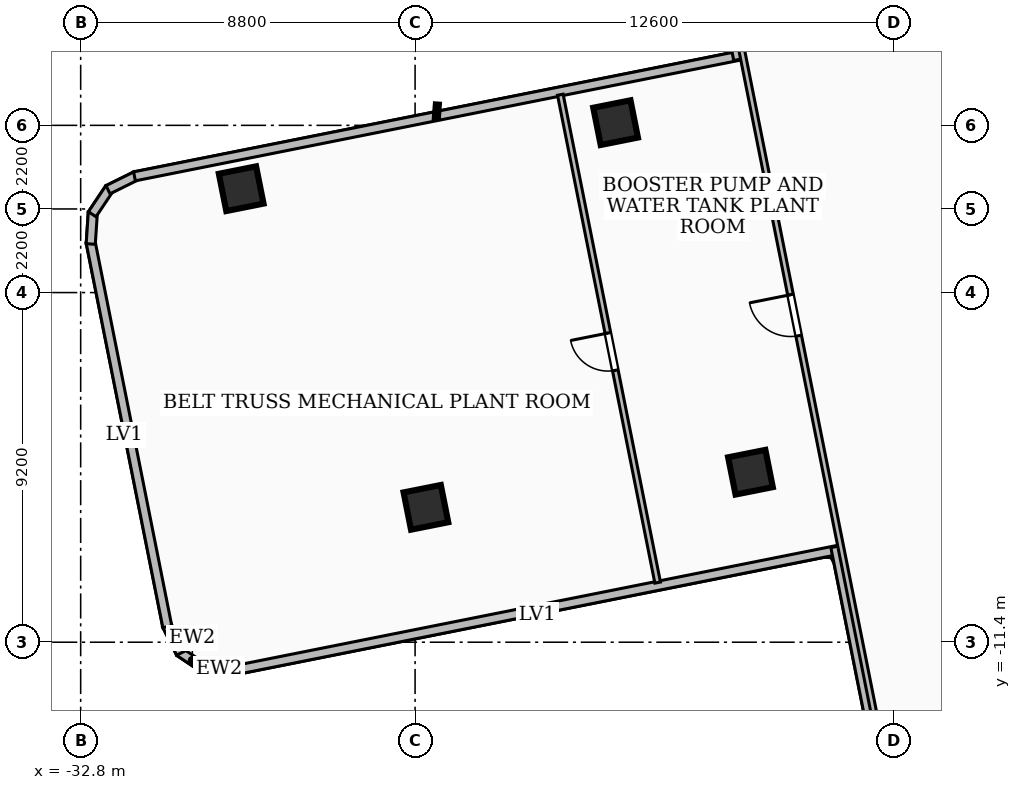
"""IFC4 building model, lengths in metres.
Left out: names, types, materials, properties, quantities, classifications, styles, units other than length and angle.
Written with IfcOpenShell. Run it as: python <this file> out.ifc"""

import sys

from ifc_helpers import new_model, si_unit, direction, frame, frame_2d, origin, origin_2d, place, context, subcontext, project, spatial, rectangle, extrude, element, fill, save


model = new_model("IFC4")
c1 = context("Model", 3, precision=1e-05, world=origin(), true_north=direction((0.0, 1.0)))
c2 = subcontext(c1, "Body", "Model", "MODEL_VIEW")
j1 = project(units=[si_unit("LENGTHUNIT", "METRE"), si_unit("PLANEANGLEUNIT", "RADIAN")], contexts=[c1])
p1 = place(None, origin())
s1 = spatial("IfcSite", under=j1, at=p1, CompositionType="ELEMENT")
p2 = place(p1, origin())
s2 = spatial("IfcBuilding", under=s1, at=p2, CompositionType="ELEMENT")
p3 = place(p2, frame((0.0, 0.0, 107.28)))
s3 = spatial("IfcBuildingStorey", under=s2, at=p3, CompositionType="ELEMENT", Elevation=107.28)
for number, where, z_axis, x_axis in (
    (1, (-18.724, 2.271, 0.0), (0.0, 0.0, 1.0), (0.981, 0.196, 0.0)),
    (2, (-15.175, -6.927, 0.0), (0.0, 0.0, 1.0), (0.981, 0.196, 0.0)),
    (3, (-28.576, 0.533, 0.0), (0.0, 0.0, 1.0), (0.981, 0.196, 0.0)),
    (4, (-23.715, -7.851, 0.0), (0.0, 0.0, 1.0), (0.981, 0.196, 0.0)),
):
    element("IfcColumn", number, at=place(p3, frame(where, z_axis=z_axis, x_axis=x_axis)), inside=s3, PredefinedType="COLUMN", context=c2, shape_type="SweptSolid", body=[
        extrude(rectangle(XDim=1.0, YDim=1.0, at=origin_2d()), origin(), (0.0, 0.0, 1.0), 4.68),
    ])
p4 = place(p3, frame((-12.829, -8.962, 0.0), z_axis=(0.0, 0.0, 1.0), x_axis=(-0.980676331544, -0.195637247858, 0.0)))
e5 = element("IfcWall", 5, at=p4, inside=s3, PredefinedType="SOLIDWALL", context=c2, shape_type="SweptSolid", body=[
    extrude(rectangle(XDim=16.275, YDim=0.24, at=frame_2d((8.138, 0.0))), origin(), (0.0, 0.0, 1.0), 2.212),
])
p5 = place(p3, frame((-28.74, -12.143, 0.0), z_axis=(0.0, 0.0, 1.0), x_axis=(-0.997792951373, 0.06640200442, 0.0)))
e6 = element("IfcWall", 6, at=p5, inside=s3, PredefinedType="SOLIDWALL", context=c2, shape_type="SweptSolid", body=[
    extrude(rectangle(XDim=0.831, YDim=0.24, at=frame_2d((0.416, 0.0))), origin(), (0.0, 0.0, 1.0), 4.42),
])
p6 = place(p3, frame((-29.523, -12.104, 0.0), z_axis=(0.0, 0.0, 1.0), x_axis=(-0.831727143475, 0.555184616867, 0.0)))
e7 = element("IfcWall", 7, at=p6, inside=s3, PredefinedType="SOLIDWALL", context=c2, shape_type="SweptSolid", body=[
    extrude(rectangle(XDim=0.814, YDim=0.24, at=frame_2d((0.407, 0.0))), origin(), (0.0, 0.0, 1.0), 4.42),
])
p7 = place(p3, frame((-30.168, -11.688, 0.0), z_axis=(0.0, 0.0, 1.0), x_axis=(-0.443794266413, 0.896128701191, 0.0)))
e8 = element("IfcWall", 8, at=p7, inside=s3, PredefinedType="SOLIDWALL", context=c2, shape_type="SweptSolid", body=[
    extrude(rectangle(XDim=0.829, YDim=0.24, at=frame_2d((0.415, 0.0))), origin(), (0.0, 0.0, 1.0), 4.42),
])
p8 = place(p3, frame((-30.52, -10.992, 0.0), z_axis=(0.0, 0.0, 1.0), x_axis=(-0.195565576703, 0.980690626655, 0.0)))
e9 = element("IfcWall", 9, at=p8, inside=s3, PredefinedType="SOLIDWALL", context=c2, shape_type="SweptSolid", body=[
    extrude(rectangle(XDim=10.319, YDim=0.24, at=frame_2d((5.16, 0.0))), origin(), (0.0, 0.0, 1.0), 4.42),
])
p9 = place(p3, frame((-32.535, -0.922, 0.0), z_axis=(0.0, 0.0, 1.0), x_axis=(0.066109477186, 0.997812375663, 0.0)))
e10 = element("IfcWall", 10, at=p9, inside=s3, PredefinedType="SOLIDWALL", context=c2, shape_type="SweptSolid", body=[
    extrude(rectangle(XDim=0.831, YDim=0.24, at=frame_2d((0.416, 0.0))), origin(), (0.0, 0.0, 1.0), 4.42),
])
p10 = place(p3, frame((-32.496, -0.139, 0.0), z_axis=(0.0, 0.0, 1.0), x_axis=(0.555392052936, 0.831588640817, 0.0)))
e11 = element("IfcWall", 11, at=p10, inside=s3, PredefinedType="SOLIDWALL", context=c2, shape_type="SweptSolid", body=[
    extrude(rectangle(XDim=0.814, YDim=0.24, at=frame_2d((0.407, 0.0))), origin(), (0.0, 0.0, 1.0), 4.42),
])
p11 = place(p3, frame((-32.08, 0.506, 0.0), z_axis=(0.0, 0.0, 1.0), x_axis=(0.896186678749, 0.443677176371, 0.0)))
e12 = element("IfcWall", 12, at=p11, inside=s3, PredefinedType="SOLIDWALL", context=c2, shape_type="SweptSolid", body=[
    extrude(rectangle(XDim=0.829, YDim=0.24, at=frame_2d((0.415, 0.0))), origin(), (0.0, 0.0, 1.0), 4.42),
])
p12 = place(p3, frame((-31.384, 0.858, 0.0), z_axis=(0.0, 0.0, 1.0), x_axis=(0.980678627862, 0.195625736687, 0.0)))
e13 = element("IfcWall", 13, at=p12, inside=s3, PredefinedType="SOLIDWALL", context=c2, shape_type="SweptSolid", body=[
    extrude(rectangle(XDim=16.276, YDim=0.24, at=frame_2d((8.138, 0.0))), origin(), (0.0, 0.0, 1.0), 2.212),
])
p13 = place(p3, frame((-15.497, 3.929, 0.0), z_axis=(0.0, 0.0, 1.0), x_axis=(-0.19569881616, 0.98066404714, 0.0)))
e14 = element("IfcWall", 14, at=p13, inside=s3, PredefinedType="SOLIDWALL", context=c2, shape_type="SweptSolid", body=[
    extrude(rectangle(XDim=6.075, YDim=0.24, at=frame_2d((3.038, 0.0))), origin(), (0.0, 0.0, 1.0), 2.212),
])
p14 = place(p3, frame((-11.616, -15.532, 0.0), z_axis=(0.0, 0.0, 1.0), x_axis=(-0.195679596911, 0.980667882289, 0.0)))
e15 = element("IfcWall", 15, at=p14, inside=s3, PredefinedType="SOLIDWALL", context=c2, shape_type="SweptSolid", body=[
    extrude(rectangle(XDim=6.776, YDim=0.24, at=frame_2d((3.388, 0.0))), origin(), (0.0, 0.0, 1.0), 2.212),
])
p15 = place(p3, frame((-11.931, -13.24, 0.0), z_axis=(0.0, 0.0, 1.0), x_axis=(-0.19557824927, 0.980688099455, 0.0)))
e16 = element("IfcWall", 16, at=p15, inside=s3, PredefinedType="PARTITIONING", context=c2, shape_type="SweptSolid", body=[
    extrude(rectangle(XDim=20.601, YDim=0.15, at=frame_2d((10.3, 0.0))), origin(), (0.0, 0.0, 1.0), 2.212),
])
p16 = place(p15, frame((10.1, 0.0, 0.0)))
e17 = element("IfcOpeningElement", 17, at=p16, cuts=e16, PredefinedType="OPENING", context=c2, shape_type="SweptSolid", body=[
    extrude(rectangle(XDim=1.1, YDim=2.15, at=frame_2d((0.55, 1.075))), frame((0.0, 0.085, 0.0), z_axis=(0.0, -1.0, 0.0), x_axis=(1.0, 0.0, 0.0)), (0.0, 0.0, 1.0), 0.17),
])
p17 = place(p3, frame((-17.617, -9.831, 0.0), z_axis=(0.0, 0.0, 1.0), x_axis=(-0.195646257456, 0.980674534157, 0.0)))
e18 = element("IfcWall", 18, at=p17, inside=s3, PredefinedType="PARTITIONING", context=c2, shape_type="SweptSolid", body=[
    extrude(rectangle(XDim=13.09, YDim=0.15, at=frame_2d((6.545, 0.0))), origin(), (0.0, 0.0, 1.0), 2.212),
])
p18 = place(p17, frame((5.695, 0.0, 0.0)))
e19 = element("IfcOpeningElement", 19, at=p18, cuts=e18, PredefinedType="OPENING", context=c2, shape_type="SweptSolid", body=[
    extrude(rectangle(XDim=1.0, YDim=2.1, at=frame_2d((0.5, 1.05))), frame((0.0, 0.085, 0.0), z_axis=(0.0, -1.0, 0.0), x_axis=(1.0, 0.0, 0.0)), (0.0, 0.0, 1.0), 0.17),
])
p19 = place(p16, origin())
e20 = element("IfcDoor", 20, at=p19, inside=s3, OperationType="SINGLE_SWING_RIGHT", PredefinedType="DOOR", context=c2, shape_type="SweptSolid", body=[
    extrude(rectangle(XDim=1.1, YDim=2.15, at=frame_2d((0.55, 1.075))), frame((0.0, 0.025, 0.0), z_axis=(0.0, -1.0, 0.0), x_axis=(1.0, 0.0, 0.0)), (0.0, 0.0, 1.0), 0.05),
])
fill(e17, e20)
p20 = place(p18, origin())
e21 = element("IfcDoor", 21, at=p20, inside=s3, OperationType="SINGLE_SWING_RIGHT", PredefinedType="DOOR", context=c2, shape_type="SweptSolid", body=[
    extrude(rectangle(XDim=1.0, YDim=2.1, at=frame_2d((0.5, 1.05))), frame((0.0, 0.025, 0.0), z_axis=(0.0, -1.0, 0.0), x_axis=(1.0, 0.0, 0.0)), (0.0, 0.0, 1.0), 0.05),
])
fill(e19, e21)
save(model, sys.argv[1])
